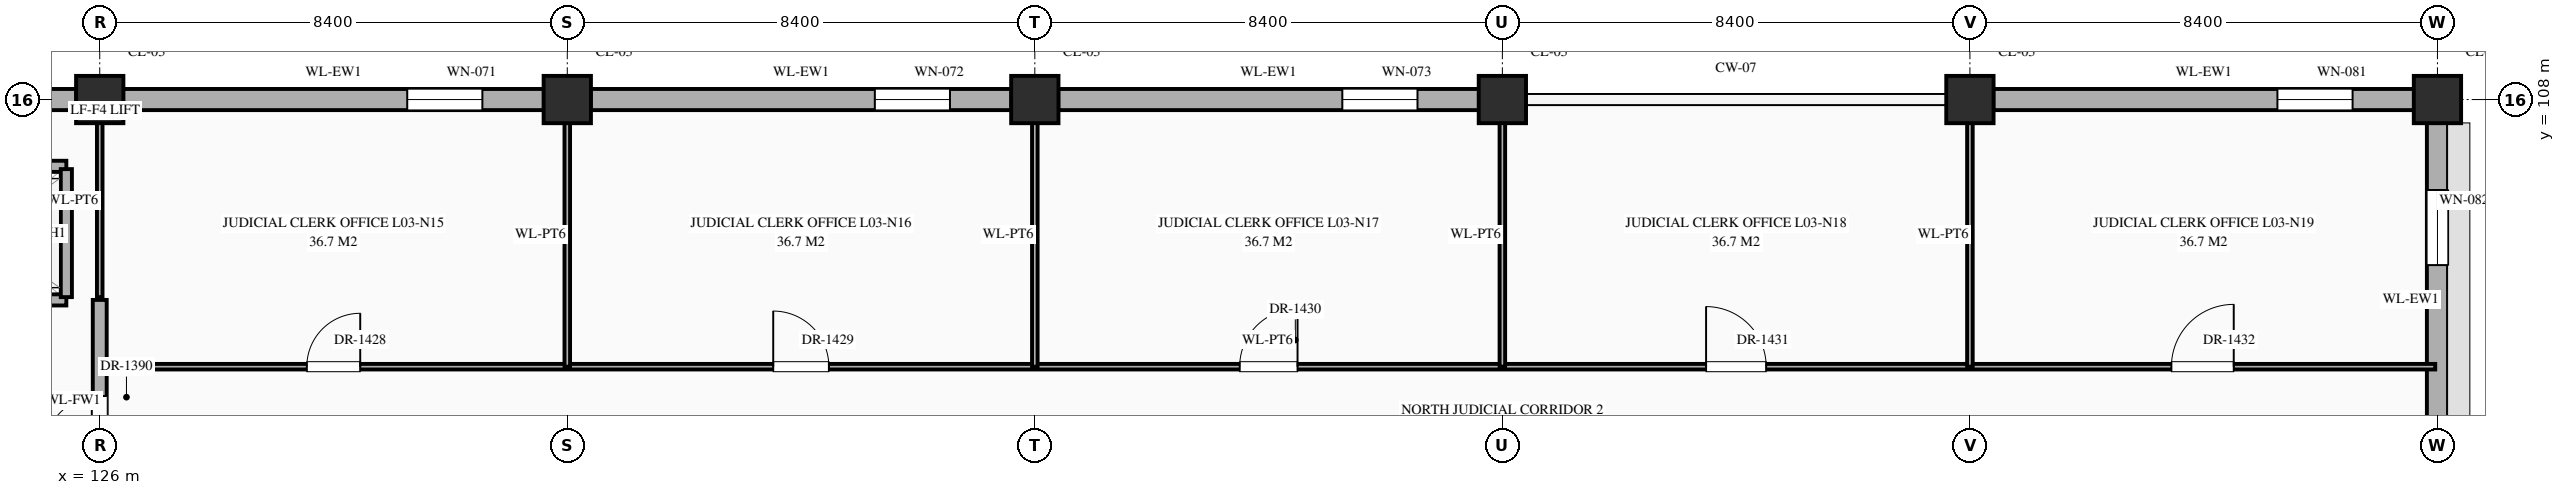
"""IFC4 building model, lengths in metres.
Left out: names, types, materials, properties, quantities, classifications, styles, units other than length and angle.
Written with IfcOpenShell. Run it as: python <this file> out.ifc"""

import sys

from ifc_helpers import new_model, si_unit, direction, frame, frame_2d, origin, origin_2d, place, context, subcontext, project, spatial, rectangle, extrude, element, fill, save


model = new_model("IFC4")
c1 = context("Model", 3, precision=1e-05, world=origin(), true_north=direction((0.0, 1.0)))
c2 = subcontext(c1, "Body", "Model", "MODEL_VIEW")
j1 = project(units=[si_unit("LENGTHUNIT", "METRE"), si_unit("PLANEANGLEUNIT", "RADIAN")], contexts=[c1])
p1 = place(None, origin())
s1 = spatial("IfcSite", under=j1, at=p1, CompositionType="ELEMENT")
p2 = place(p1, origin())
s2 = spatial("IfcBuilding", under=s1, at=p2, CompositionType="ELEMENT")
p3 = place(p2, frame((0.0, 0.0, 10.8)))
s3 = spatial("IfcBuildingStorey", under=s2, at=p3, CompositionType="ELEMENT", Elevation=10.8)
for number, where, z_axis, x_axis in (
    (1, (126.0, 108.0, 0.0), (0.0, 0.0, 1.0), (1.0, 0.0, 0.0)),
    (2, (134.4, 108.0, 0.0), (0.0, 0.0, 1.0), (1.0, 0.0, 0.0)),
    (3, (142.8, 108.0, 0.0), (0.0, 0.0, 1.0), (1.0, 0.0, 0.0)),
    (4, (151.2, 108.0, 0.0), (0.0, 0.0, 1.0), (1.0, 0.0, 0.0)),
    (5, (159.6, 108.0, 0.0), (0.0, 0.0, 1.0), (1.0, 0.0, 0.0)),
    (6, (168.0, 108.0, 0.0), (0.0, 0.0, 1.0), (1.0, 0.0, 0.0)),
):
    element("IfcColumn", number, at=place(p3, frame(where, z_axis=z_axis, x_axis=x_axis)), inside=s3, PredefinedType="COLUMN", context=c2, shape_type="SweptSolid", body=[
        extrude(rectangle(XDim=0.85, YDim=0.85, at=origin_2d()), origin(), (0.0, 0.0, 1.0), 5.4),
    ])
p4 = place(p3, frame((118.045, 108.0, 0.0), z_axis=(0.0, 0.0, 1.0), x_axis=(1.0, 0.0, 0.0)))
e7 = element("IfcWall", 7, at=p4, inside=s3, PredefinedType="STANDARD", context=c2, shape_type="SweptSolid", body=[
    extrude(rectangle(XDim=7.535, YDim=0.38, at=frame_2d((3.768, 0.0))), origin(), (0.0, 0.0, 1.0), 4.47),
])
p5 = place(p3, frame((126.42, 108.0, 0.0), z_axis=(0.0, 0.0, 1.0), x_axis=(1.0, 0.0, 0.0)))
e8 = element("IfcWall", 8, at=p5, inside=s3, PredefinedType="STANDARD", context=c2, shape_type="SweptSolid", body=[
    extrude(rectangle(XDim=7.56, YDim=0.38, at=frame_2d((3.78, 0.0))), origin(), (0.0, 0.0, 1.0), 4.47),
])
p6 = place(p5, frame((5.105, 0.0, 0.85)))
e9 = element("IfcOpeningElement", 9, at=p6, cuts=e8, PredefinedType="OPENING", context=c2, shape_type="SweptSolid", body=[
    extrude(rectangle(XDim=1.35, YDim=1.2, at=frame_2d((0.675, 0.6))), frame((0.0, 0.202, 0.0), z_axis=(0.0, -1.0, 0.0), x_axis=(1.0, 0.0, 0.0)), (0.0, 0.0, 1.0), 0.404),
])
p7 = place(p3, frame((134.82, 108.0, 0.0), z_axis=(0.0, 0.0, 1.0), x_axis=(1.0, 0.0, 0.0)))
e10 = element("IfcWall", 10, at=p7, inside=s3, PredefinedType="STANDARD", context=c2, shape_type="SweptSolid", body=[
    extrude(rectangle(XDim=7.56, YDim=0.38, at=frame_2d((3.78, 0.0))), origin(), (0.0, 0.0, 1.0), 4.47),
])
p8 = place(p7, frame((5.105, 0.0, 0.85)))
e11 = element("IfcOpeningElement", 11, at=p8, cuts=e10, PredefinedType="OPENING", context=c2, shape_type="SweptSolid", body=[
    extrude(rectangle(XDim=1.35, YDim=1.38, at=frame_2d((0.675, 0.69))), frame((0.0, 0.202, 0.0), z_axis=(0.0, -1.0, 0.0), x_axis=(1.0, 0.0, 0.0)), (0.0, 0.0, 1.0), 0.404),
])
p9 = place(p3, frame((143.22, 108.0, 0.0), z_axis=(0.0, 0.0, 1.0), x_axis=(1.0, 0.0, 0.0)))
e12 = element("IfcWall", 12, at=p9, inside=s3, PredefinedType="STANDARD", context=c2, shape_type="SweptSolid", body=[
    extrude(rectangle(XDim=7.56, YDim=0.38, at=frame_2d((3.78, 0.0))), origin(), (0.0, 0.0, 1.0), 4.47),
])
p10 = place(p9, frame((5.105, 0.0, 0.85)))
e13 = element("IfcOpeningElement", 13, at=p10, cuts=e12, PredefinedType="OPENING", context=c2, shape_type="SweptSolid", body=[
    extrude(rectangle(XDim=1.35, YDim=1.56, at=frame_2d((0.675, 0.78))), frame((0.0, 0.202, 0.0), z_axis=(0.0, -1.0, 0.0), x_axis=(1.0, 0.0, 0.0)), (0.0, 0.0, 1.0), 0.404),
])
p11 = place(p3, frame((160.02, 108.0, 0.0), z_axis=(0.0, 0.0, 1.0), x_axis=(1.0, 0.0, 0.0)))
e14 = element("IfcWall", 14, at=p11, inside=s3, PredefinedType="STANDARD", context=c2, shape_type="SweptSolid", body=[
    extrude(rectangle(XDim=7.56, YDim=0.38, at=frame_2d((3.78, 0.0))), origin(), (0.0, 0.0, 1.0), 4.47),
])
p12 = place(p11, frame((5.105, 0.0, 0.85)))
e15 = element("IfcOpeningElement", 15, at=p12, cuts=e14, PredefinedType="OPENING", context=c2, shape_type="SweptSolid", body=[
    extrude(rectangle(XDim=1.35, YDim=1.92, at=frame_2d((0.675, 0.96))), frame((0.0, 0.202, 0.0), z_axis=(0.0, -1.0, 0.0), x_axis=(1.0, 0.0, 0.0)), (0.0, 0.0, 1.0), 0.404),
])
p13 = place(p3, frame((168.0, 101.22, 0.0), z_axis=(0.0, 0.0, 1.0), x_axis=(0.0, 1.0, 0.0)))
e16 = element("IfcWall", 16, at=p13, inside=s3, PredefinedType="STANDARD", context=c2, shape_type="SweptSolid", body=[
    extrude(rectangle(XDim=6.36, YDim=0.38, at=frame_2d((3.18, 0.0))), origin(), (0.0, 0.0, 1.0), 4.47),
])
p14 = place(p13, frame((3.805, 0.0, 0.85)))
e17 = element("IfcOpeningElement", 17, at=p14, cuts=e16, PredefinedType="OPENING", context=c2, shape_type="SweptSolid", body=[
    extrude(rectangle(XDim=1.35, YDim=1.38, at=frame_2d((0.675, 0.69))), frame((0.0, 0.202, 0.0), z_axis=(0.0, -1.0, 0.0), x_axis=(1.0, 0.0, 0.0)), (0.0, 0.0, 1.0), 0.404),
])
p15 = place(p3, frame((126.0, 103.2, 0.0), z_axis=(0.0, 0.0, 1.0), x_axis=(1.0, 0.0, 0.0)))
e18 = element("IfcWall", 18, at=p15, inside=s3, PredefinedType="STANDARD", context=c2, shape_type="SweptSolid", body=[
    extrude(rectangle(XDim=41.96, YDim=0.1, at=frame_2d((20.98, 0.0))), origin(), (0.0, 0.0, 1.0), 5.12),
])
p16 = place(p15, frame((3.72, 0.0, 0.0)))
e19 = element("IfcOpeningElement", 19, at=p16, cuts=e18, PredefinedType="OPENING", context=c2, shape_type="SweptSolid", body=[
    extrude(rectangle(XDim=0.96, YDim=2.2, at=frame_2d((0.48, 1.1))), frame((0.0, 0.062, 0.0), z_axis=(0.0, -1.0, 0.0), x_axis=(1.0, 0.0, 0.0)), (0.0, 0.0, 1.0), 0.124),
])
p17 = place(p15, frame((12.1, 0.0, 0.0)))
e20 = element("IfcOpeningElement", 20, at=p17, cuts=e18, PredefinedType="OPENING", context=c2, shape_type="SweptSolid", body=[
    extrude(rectangle(XDim=1.0, YDim=2.25, at=frame_2d((0.5, 1.125))), frame((0.0, 0.062, 0.0), z_axis=(0.0, -1.0, 0.0), x_axis=(1.0, 0.0, 0.0)), (0.0, 0.0, 1.0), 0.124),
])
p18 = place(p15, frame((20.48, 0.0, 0.0)))
e21 = element("IfcOpeningElement", 21, at=p18, cuts=e18, PredefinedType="OPENING", context=c2, shape_type="SweptSolid", body=[
    extrude(rectangle(XDim=1.04, YDim=2.2, at=frame_2d((0.52, 1.1))), frame((0.0, 0.062, 0.0), z_axis=(0.0, -1.0, 0.0), x_axis=(1.0, 0.0, 0.0)), (0.0, 0.0, 1.0), 0.124),
])
p19 = place(p15, frame((28.86, 0.0, 0.0)))
e22 = element("IfcOpeningElement", 22, at=p19, cuts=e18, PredefinedType="OPENING", context=c2, shape_type="SweptSolid", body=[
    extrude(rectangle(XDim=1.08, YDim=2.25, at=frame_2d((0.54, 1.125))), frame((0.0, 0.062, 0.0), z_axis=(0.0, -1.0, 0.0), x_axis=(1.0, 0.0, 0.0)), (0.0, 0.0, 1.0), 0.124),
])
p20 = place(p15, frame((37.22, 0.0, 0.0)))
e23 = element("IfcOpeningElement", 23, at=p20, cuts=e18, PredefinedType="OPENING", context=c2, shape_type="SweptSolid", body=[
    extrude(rectangle(XDim=1.12, YDim=2.25, at=frame_2d((0.56, 1.125))), frame((0.0, 0.062, 0.0), z_axis=(0.0, -1.0, 0.0), x_axis=(1.0, 0.0, 0.0)), (0.0, 0.0, 1.0), 0.124),
])
p21 = place(p3, frame((122.4, 104.4, 0.0), z_axis=(0.0, 0.0, 1.0), x_axis=(1.0, 0.0, 0.0)))
e24 = element("IfcWall", 24, at=p21, inside=s3, PredefinedType="STANDARD", context=c2, shape_type="SweptSolid", body=[
    extrude(rectangle(XDim=3.0, YDim=0.2, at=frame_2d((1.5, 0.0))), origin(), (0.0, 0.0, 1.0), 5.12),
])
p22 = place(p21, frame((0.9, 0.0, 0.0)))
e25 = element("IfcOpeningElement", 25, at=p22, cuts=e24, PredefinedType="OPENING", context=c2, shape_type="SweptSolid", body=[
    extrude(rectangle(XDim=1.2, YDim=2.15, at=frame_2d((0.6, 1.075))), frame((0.0, 0.112, 0.0), z_axis=(0.0, -1.0, 0.0), x_axis=(1.0, 0.0, 0.0)), (0.0, 0.0, 1.0), 0.224),
])
p23 = place(p3, frame((122.4, 106.8, 0.0), z_axis=(0.0, 0.0, 1.0), x_axis=(1.0, 0.0, 0.0)))
e26 = element("IfcWall", 26, at=p23, inside=s3, PredefinedType="STANDARD", context=c2, shape_type="SweptSolid", body=[
    extrude(rectangle(XDim=3.0, YDim=0.2, at=frame_2d((1.5, 0.0))), origin(), (0.0, 0.0, 1.0), 5.12),
])
p24 = place(p3, frame((125.4, 104.45, 0.0), z_axis=(0.0, 0.0, 1.0), x_axis=(0.0, 1.0, 0.0)))
e27 = element("IfcWall", 27, at=p24, inside=s3, PredefinedType="STANDARD", context=c2, shape_type="SweptSolid", body=[
    extrude(rectangle(XDim=2.3, YDim=0.2, at=frame_2d((1.15, 0.0))), origin(), (0.0, 0.0, 1.0), 5.12),
])
p25 = place(p3, frame((126.0, 100.8, 0.0), z_axis=(0.0, 0.0, 1.0), x_axis=(0.0, 1.0, 0.0)))
e28 = element("IfcWall", 28, at=p25, inside=s3, PredefinedType="STANDARD", context=c2, shape_type="SweptSolid", body=[
    extrude(rectangle(XDim=3.6, YDim=0.25, at=frame_2d((1.8, 0.0))), origin(), (0.0, 0.0, 1.0), 4.37),
])
p26 = place(p25, frame((0.873, 0.0, 0.0)))
e29 = element("IfcOpeningElement", 29, at=p26, cuts=e28, PredefinedType="OPENING", context=c2, shape_type="SweptSolid", body=[
    extrude(rectangle(XDim=1.0, YDim=2.2, at=frame_2d((0.5, 1.1))), frame((0.0, 0.137, 0.0), z_axis=(0.0, -1.0, 0.0), x_axis=(1.0, 0.0, 0.0)), (0.0, 0.0, 1.0), 0.274),
])
p27 = place(p3, frame((126.0, 104.45, 0.0), z_axis=(0.0, 0.0, 1.0), x_axis=(0.0, 1.0, 0.0)))
e30 = element("IfcWall", 30, at=p27, inside=s3, PredefinedType="STANDARD", context=c2, shape_type="SweptSolid", body=[
    extrude(rectangle(XDim=3.46, YDim=0.1, at=frame_2d((1.73, 0.0))), origin(), (0.0, 0.0, 1.0), 4.37),
])
for number, where, z_axis, x_axis in (
    (31, (134.4, 103.2, 0.0), (0.0, 0.0, 1.0), (0.0, 1.0, 0.0)),
    (32, (142.8, 103.2, 0.0), (0.0, 0.0, 1.0), (0.0, 1.0, 0.0)),
    (33, (151.2, 103.2, 0.0), (0.0, 0.0, 1.0), (0.0, 1.0, 0.0)),
    (34, (159.6, 103.2, 0.0), (0.0, 0.0, 1.0), (0.0, 1.0, 0.0)),
):
    element("IfcWall", number, at=place(p3, frame(where, z_axis=z_axis, x_axis=x_axis)), inside=s3, PredefinedType="STANDARD", context=c2, shape_type="SweptSolid", body=[
        extrude(rectangle(XDim=4.76, YDim=0.1, at=frame_2d((2.38, 0.0))), origin(), (0.0, 0.0, 1.0), 4.37),
    ])
p28 = place(p6, origin())
e35 = element("IfcWindow", 35, at=p28, inside=s3, PartitioningType="SINGLE_PANEL", PredefinedType="WINDOW", context=c2, shape_type="SweptSolid", body=[
    extrude(rectangle(XDim=1.35, YDim=1.2, at=frame_2d((0.675, 0.6))), frame((0.0, 0.03, 0.0), z_axis=(0.0, -1.0, 0.0), x_axis=(1.0, 0.0, 0.0)), (0.0, 0.0, 1.0), 0.06),
])
fill(e9, e35)
p29 = place(p8, origin())
e36 = element("IfcWindow", 36, at=p29, inside=s3, PartitioningType="SINGLE_PANEL", PredefinedType="WINDOW", context=c2, shape_type="SweptSolid", body=[
    extrude(rectangle(XDim=1.35, YDim=1.38, at=frame_2d((0.675, 0.69))), frame((0.0, 0.03, 0.0), z_axis=(0.0, -1.0, 0.0), x_axis=(1.0, 0.0, 0.0)), (0.0, 0.0, 1.0), 0.06),
])
fill(e11, e36)
p30 = place(p10, origin())
e37 = element("IfcWindow", 37, at=p30, inside=s3, PartitioningType="SINGLE_PANEL", PredefinedType="WINDOW", context=c2, shape_type="SweptSolid", body=[
    extrude(rectangle(XDim=1.35, YDim=1.56, at=frame_2d((0.675, 0.78))), frame((0.0, 0.03, 0.0), z_axis=(0.0, -1.0, 0.0), x_axis=(1.0, 0.0, 0.0)), (0.0, 0.0, 1.0), 0.06),
])
fill(e13, e37)
p31 = place(p12, origin())
e38 = element("IfcWindow", 38, at=p31, inside=s3, PartitioningType="SINGLE_PANEL", PredefinedType="WINDOW", context=c2, shape_type="SweptSolid", body=[
    extrude(rectangle(XDim=1.35, YDim=1.92, at=frame_2d((0.675, 0.96))), frame((0.0, 0.03, 0.0), z_axis=(0.0, -1.0, 0.0), x_axis=(1.0, 0.0, 0.0)), (0.0, 0.0, 1.0), 0.06),
])
fill(e15, e38)
p32 = place(p14, origin())
e39 = element("IfcWindow", 39, at=p32, inside=s3, PartitioningType="SINGLE_PANEL", PredefinedType="WINDOW", context=c2, shape_type="SweptSolid", body=[
    extrude(rectangle(XDim=1.35, YDim=1.38, at=frame_2d((0.675, 0.69))), frame((0.0, 0.03, 0.0), z_axis=(0.0, -1.0, 0.0), x_axis=(1.0, 0.0, 0.0)), (0.0, 0.0, 1.0), 0.06),
])
fill(e17, e39)
p33 = place(p26, origin())
e40 = element("IfcDoor", 40, at=p33, inside=s3, OperationType="SINGLE_SWING_LEFT", PredefinedType="DOOR", context=c2, shape_type="SweptSolid", body=[
    extrude(rectangle(XDim=1.0, YDim=2.2, at=frame_2d((0.5, 1.1))), frame((0.0, 0.025, 0.0), z_axis=(0.0, -1.0, 0.0), x_axis=(1.0, 0.0, 0.0)), (0.0, 0.0, 1.0), 0.05),
])
fill(e29, e40)
p34 = place(p16, origin())
e41 = element("IfcDoor", 41, at=p34, inside=s3, OperationType="SINGLE_SWING_RIGHT", PredefinedType="DOOR", context=c2, shape_type="SweptSolid", body=[
    extrude(rectangle(XDim=0.96, YDim=2.2, at=frame_2d((0.48, 1.1))), frame((0.0, 0.025, 0.0), z_axis=(0.0, -1.0, 0.0), x_axis=(1.0, 0.0, 0.0)), (0.0, 0.0, 1.0), 0.05),
])
fill(e19, e41)
p35 = place(p17, origin())
e42 = element("IfcDoor", 42, at=p35, inside=s3, OperationType="SINGLE_SWING_LEFT", PredefinedType="DOOR", context=c2, shape_type="SweptSolid", body=[
    extrude(rectangle(XDim=1.0, YDim=2.25, at=frame_2d((0.5, 1.125))), frame((0.0, 0.025, 0.0), z_axis=(0.0, -1.0, 0.0), x_axis=(1.0, 0.0, 0.0)), (0.0, 0.0, 1.0), 0.05),
])
fill(e20, e42)
p36 = place(p18, origin())
e43 = element("IfcDoor", 43, at=p36, inside=s3, OperationType="SINGLE_SWING_RIGHT", PredefinedType="DOOR", context=c2, shape_type="SweptSolid", body=[
    extrude(rectangle(XDim=1.04, YDim=2.2, at=frame_2d((0.52, 1.1))), frame((0.0, 0.025, 0.0), z_axis=(0.0, -1.0, 0.0), x_axis=(1.0, 0.0, 0.0)), (0.0, 0.0, 1.0), 0.05),
])
fill(e21, e43)
p37 = place(p19, origin())
e44 = element("IfcDoor", 44, at=p37, inside=s3, OperationType="SINGLE_SWING_LEFT", PredefinedType="DOOR", context=c2, shape_type="SweptSolid", body=[
    extrude(rectangle(XDim=1.08, YDim=2.25, at=frame_2d((0.54, 1.125))), frame((0.0, 0.025, 0.0), z_axis=(0.0, -1.0, 0.0), x_axis=(1.0, 0.0, 0.0)), (0.0, 0.0, 1.0), 0.05),
])
fill(e22, e44)
p38 = place(p20, origin())
e45 = element("IfcDoor", 45, at=p38, inside=s3, OperationType="SINGLE_SWING_RIGHT", PredefinedType="DOOR", context=c2, shape_type="SweptSolid", body=[
    extrude(rectangle(XDim=1.12, YDim=2.25, at=frame_2d((0.56, 1.125))), frame((0.0, 0.025, 0.0), z_axis=(0.0, -1.0, 0.0), x_axis=(1.0, 0.0, 0.0)), (0.0, 0.0, 1.0), 0.05),
])
fill(e23, e45)
save(model, sys.argv[1])
